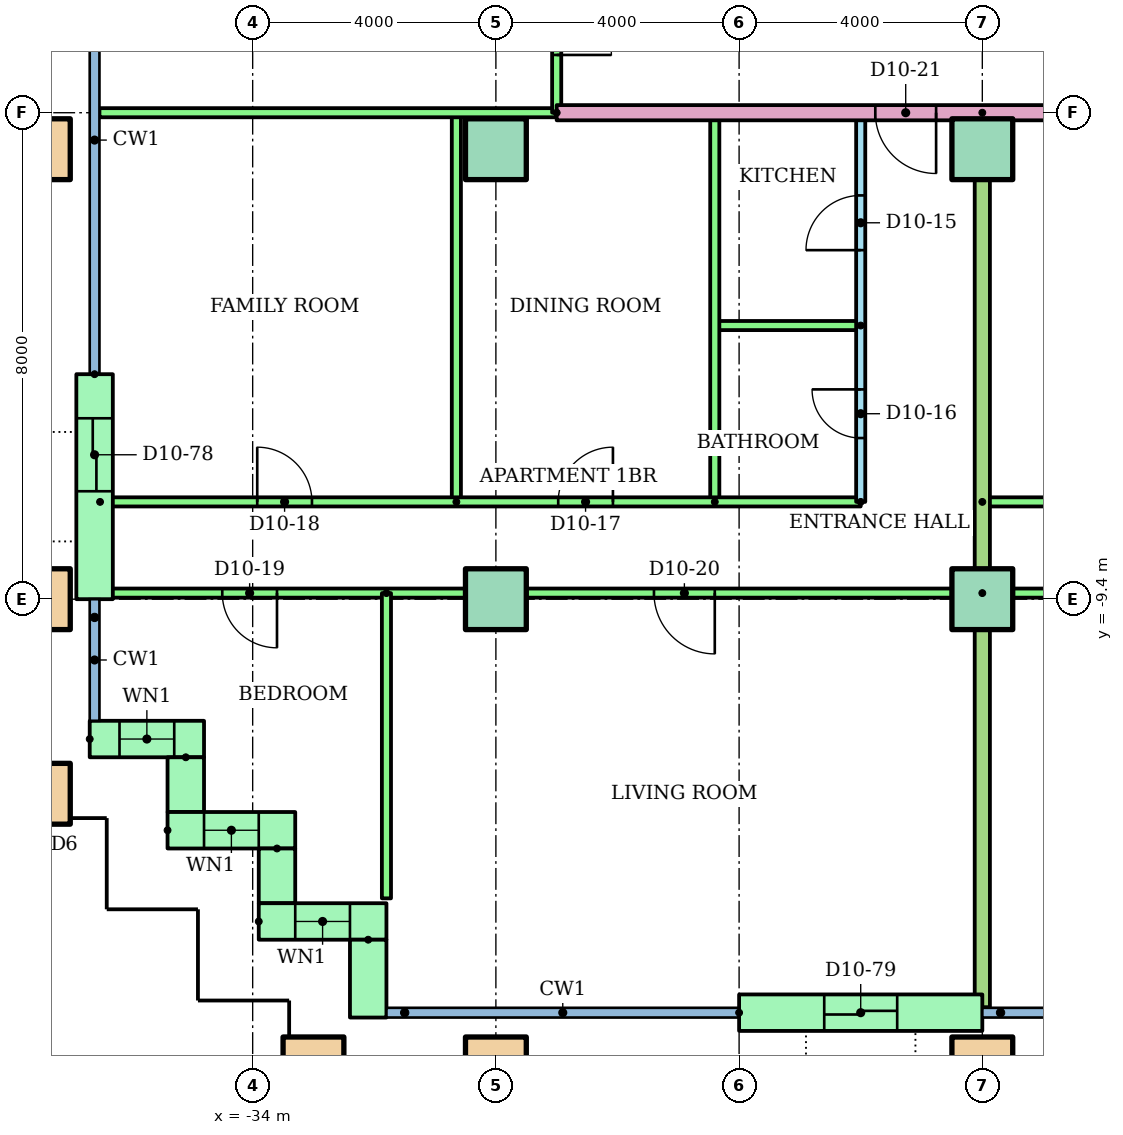
"""IFC4 building model, lengths in metres.
Left out: names, types, materials, properties, quantities, classifications, styles, units other than length and angle.
Written with IfcOpenShell. Run it as: python <this file> out.ifc"""

import sys

from ifc_helpers import new_model, si_unit, direction, frame, frame_2d, origin, origin_2d, place, context, subcontext, project, spatial, rectangle, hollow_rectangle, extrude, element, fill, save


model = new_model("IFC4")
c1 = context("Model", 3, precision=1e-05, world=origin(), true_north=direction((0.0, 1.0)))
c2 = subcontext(c1, "Body", "Model", "MODEL_VIEW")
j1 = project(units=[si_unit("LENGTHUNIT", "METRE"), si_unit("PLANEANGLEUNIT", "RADIAN")], contexts=[c1])
p1 = place(None, origin())
s1 = spatial("IfcSite", under=j1, at=p1, CompositionType="ELEMENT")
p2 = place(p1, origin())
s2 = spatial("IfcBuilding", under=s1, at=p2, CompositionType="ELEMENT")
p3 = place(p2, frame((0.0, 0.0, 41.6)))
s3 = spatial("IfcBuildingStorey", under=s2, at=p3, CompositionType="ELEMENT", Elevation=41.6)
for number, where in (
    (1, (-33.0, -17.1, 0.0)),
    (2, (-30.0, -17.1, 0.0)),
    (3, (-22.0, -17.1, 0.0)),
    (4, (-37.5, -12.6, 0.0)),
    (5, (-37.5, -9.4, 0.0)),
):
    element("IfcColumn", number, at=place(p3, frame(where)), inside=s3, PredefinedType="COLUMN", context=c2, shape_type="SweptSolid", body=[
        extrude(hollow_rectangle(XDim=1.0, YDim=1.0, WallThickness=0.05, at=origin_2d()), origin(), (0.0, 0.0, 1.0), 3.2),
    ])
for number, where in (
    (6, (-30.0, -9.4, 0.0)),
    (7, (-22.0, -9.4, 0.0)),
):
    element("IfcColumn", number, at=place(p3, frame(where)), inside=s3, PredefinedType="COLUMN", context=c2, shape_type="SweptSolid", body=[
        extrude(rectangle(XDim=1.0, YDim=1.0, at=origin_2d()), origin(), (0.0, 0.0, 1.0), 3.2),
    ])
p4 = place(p3, frame((-37.5, -2.0, 0.0)))
e8 = element("IfcColumn", 8, at=p4, inside=s3, PredefinedType="COLUMN", context=c2, shape_type="SweptSolid", body=[
    extrude(hollow_rectangle(XDim=1.0, YDim=1.0, WallThickness=0.05, at=origin_2d()), origin(), (0.0, 0.0, 1.0), 3.2),
])
for number, where in (
    (9, (-30.0, -2.0, 0.0)),
    (10, (-22.0, -2.0, 0.0)),
):
    element("IfcColumn", number, at=place(p3, frame(where)), inside=s3, PredefinedType="COLUMN", context=c2, shape_type="SweptSolid", body=[
        extrude(rectangle(XDim=1.0, YDim=1.0, at=origin_2d()), origin(), (0.0, 0.0, 1.0), 3.2),
    ])
p5 = place(p3, frame((-36.6, -5.7, 0.0), z_axis=(0.0, 0.0, 1.0), x_axis=(0.0, -1.0, 0.0)))
e11 = element("IfcWall", 11, at=p5, inside=s3, PredefinedType="STANDARD", context=c2, shape_type="SweptSolid", body=[
    extrude(rectangle(XDim=3.7, YDim=0.6, at=frame_2d((1.85, 0.0))), origin(), (0.0, 0.0, 1.0), 2.92),
])
p6 = place(p5, frame((0.725, 0.0, 0.0)))
e12 = element("IfcOpeningElement", 12, at=p6, cuts=e11, PredefinedType="OPENING", context=c2, shape_type="SweptSolid", body=[
    extrude(rectangle(XDim=1.2, YDim=2.1, at=frame_2d((0.6, 1.05))), frame((0.0, 0.31, 0.0), z_axis=(0.0, -1.0, 0.0), x_axis=(1.0, 0.0, 0.0)), (0.0, 0.0, 1.0), 0.62),
])
p7 = place(p3, frame((-36.68, -11.7, 0.0)))
e13 = element("IfcWall", 13, at=p7, inside=s3, PredefinedType="STANDARD", context=c2, shape_type="SweptSolid", body=[
    extrude(rectangle(XDim=1.88, YDim=0.6, at=frame_2d((0.94, 0.0))), origin(), (0.0, 0.0, 1.0), 2.92),
])
p8 = place(p7, frame((0.49, 0.0, 0.9)))
e14 = element("IfcOpeningElement", 14, at=p8, cuts=e13, PredefinedType="OPENING", context=c2, shape_type="SweptSolid", body=[
    extrude(rectangle(XDim=0.9, YDim=1.5, at=frame_2d((0.45, 0.75))), frame((0.0, 0.31, 0.0), z_axis=(0.0, -1.0, 0.0), x_axis=(1.0, 0.0, 0.0)), (0.0, 0.0, 1.0), 0.62),
])
p9 = place(p3, frame((-35.1, -12.0, 0.0), z_axis=(0.0, 0.0, 1.0), x_axis=(0.0, -1.0, 0.0)))
e15 = element("IfcWall", 15, at=p9, inside=s3, PredefinedType="STANDARD", context=c2, shape_type="SweptSolid", body=[
    extrude(rectangle(XDim=0.9, YDim=0.6, at=frame_2d((0.45, 0.0))), origin(), (0.0, 0.0, 1.0), 2.92),
])
p10 = place(p3, frame((-35.4, -13.2, 0.0)))
e16 = element("IfcWall", 16, at=p10, inside=s3, PredefinedType="STANDARD", context=c2, shape_type="SweptSolid", body=[
    extrude(rectangle(XDim=2.1, YDim=0.6, at=frame_2d((1.05, 0.0))), origin(), (0.0, 0.0, 1.0), 2.92),
])
p11 = place(p10, frame((0.6, 0.0, 0.9)))
e17 = element("IfcOpeningElement", 17, at=p11, cuts=e16, PredefinedType="OPENING", context=c2, shape_type="SweptSolid", body=[
    extrude(rectangle(XDim=0.9, YDim=1.5, at=frame_2d((0.45, 0.75))), frame((0.0, 0.31, 0.0), z_axis=(0.0, -1.0, 0.0), x_axis=(1.0, 0.0, 0.0)), (0.0, 0.0, 1.0), 0.62),
])
p12 = place(p3, frame((-33.6, -13.5, 0.0), z_axis=(0.0, 0.0, 1.0), x_axis=(0.0, -1.0, 0.0)))
e18 = element("IfcWall", 18, at=p12, inside=s3, PredefinedType="STANDARD", context=c2, shape_type="SweptSolid", body=[
    extrude(rectangle(XDim=0.9, YDim=0.6, at=frame_2d((0.45, 0.0))), origin(), (0.0, 0.0, 1.0), 2.92),
])
p13 = place(p3, frame((-33.9, -14.7, 0.0)))
e19 = element("IfcWall", 19, at=p13, inside=s3, PredefinedType="STANDARD", context=c2, shape_type="SweptSolid", body=[
    extrude(rectangle(XDim=2.1, YDim=0.6, at=frame_2d((1.05, 0.0))), origin(), (0.0, 0.0, 1.0), 2.92),
])
p14 = place(p13, frame((0.6, 0.0, 0.9)))
e20 = element("IfcOpeningElement", 20, at=p14, cuts=e19, PredefinedType="OPENING", context=c2, shape_type="SweptSolid", body=[
    extrude(rectangle(XDim=0.9, YDim=1.5, at=frame_2d((0.45, 0.75))), frame((0.0, 0.31, 0.0), z_axis=(0.0, -1.0, 0.0), x_axis=(1.0, 0.0, 0.0)), (0.0, 0.0, 1.0), 0.62),
])
p15 = place(p3, frame((-32.1, -15.0, 0.0), z_axis=(0.0, 0.0, 1.0), x_axis=(0.0, -1.0, 0.0)))
e21 = element("IfcWall", 21, at=p15, inside=s3, PredefinedType="STANDARD", context=c2, shape_type="SweptSolid", body=[
    extrude(rectangle(XDim=1.28, YDim=0.6, at=frame_2d((0.64, 0.0))), origin(), (0.0, 0.0, 1.0), 2.92),
])
p16 = place(p3, frame((-26.0, -16.2, 0.0)))
e22 = element("IfcWall", 22, at=p16, inside=s3, PredefinedType="STANDARD", context=c2, shape_type="SweptSolid", body=[
    extrude(rectangle(XDim=4.0, YDim=0.6, at=frame_2d((2.0, 0.0))), origin(), (0.0, 0.0, 1.0), 2.92),
])
p17 = place(p16, frame((1.4, 0.0, 0.0)))
e23 = element("IfcOpeningElement", 23, at=p17, cuts=e22, PredefinedType="OPENING", context=c2, shape_type="SweptSolid", body=[
    extrude(rectangle(XDim=1.2, YDim=2.1, at=frame_2d((0.6, 1.05))), frame((0.0, 0.31, 0.0), z_axis=(0.0, -1.0, 0.0), x_axis=(1.0, 0.0, 0.0)), (0.0, 0.0, 1.0), 0.62),
])
p18 = place(p3, frame((-24.0, -7.8, 0.0), z_axis=(0.0, 0.0, 1.0), x_axis=(0.0, 1.0, 0.0)))
e24 = element("IfcWall", 24, at=p18, inside=s3, PredefinedType="PARTITIONING", context=c2, shape_type="SweptSolid", body=[
    extrude(rectangle(XDim=6.4, YDim=0.15, at=frame_2d((3.2, 0.0))), origin(), (0.0, 0.0, 1.0), 2.4),
])
p19 = place(p18, frame((4.14, 0.0, 0.0)))
e25 = element("IfcOpeningElement", 25, at=p19, cuts=e24, PredefinedType="OPENING", context=c2, shape_type="SweptSolid", body=[
    extrude(rectangle(XDim=0.9, YDim=2.1, at=frame_2d((0.45, 1.05))), frame((0.0, 0.085, 0.0), z_axis=(0.0, -1.0, 0.0), x_axis=(1.0, 0.0, 0.0)), (0.0, 0.0, 1.0), 0.17),
])
p20 = place(p18, frame((1.05, 0.0, 0.0)))
e26 = element("IfcOpeningElement", 26, at=p20, cuts=e24, PredefinedType="OPENING", context=c2, shape_type="SweptSolid", body=[
    extrude(rectangle(XDim=0.8, YDim=2.1, at=frame_2d((0.4, 1.05))), frame((0.0, 0.085, 0.0), z_axis=(0.0, -1.0, 0.0), x_axis=(1.0, 0.0, 0.0)), (0.0, 0.0, 1.0), 0.17),
])
p21 = place(p3, frame((-24.0, -4.9, 0.0), z_axis=(0.0, 0.0, 1.0), x_axis=(-1.0, 0.0, 0.0)))
e27 = element("IfcWall", 27, at=p21, inside=s3, PredefinedType="PARTITIONING", context=c2, shape_type="SweptSolid", body=[
    extrude(rectangle(XDim=2.4, YDim=0.15, at=frame_2d((1.2, 0.0))), origin(), (0.0, 0.0, 1.0), 2.4),
])
for number, where, z_axis, x_axis in (
    (28, (-26.4, -7.8, 0.0), (0.0, 0.0, 1.0), (0.0, 1.0, 0.0)),
    (29, (-30.65, -7.8, 0.0), (0.0, 0.0, 1.0), (0.0, 1.0, 0.0)),
):
    element("IfcWall", number, at=place(p3, frame(where, z_axis=z_axis, x_axis=x_axis)), inside=s3, PredefinedType="PARTITIONING", context=c2, shape_type="SweptSolid", body=[
        extrude(rectangle(XDim=6.4, YDim=0.15, at=frame_2d((3.2, 0.0))), origin(), (0.0, 0.0, 1.0), 2.4),
    ])
p22 = place(p3, frame((-36.51, -7.8, 0.0)))
e30 = element("IfcWall", 30, at=p22, inside=s3, PredefinedType="PARTITIONING", context=c2, shape_type="SweptSolid", body=[
    extrude(rectangle(XDim=12.51, YDim=0.15, at=frame_2d((6.255, 0.0))), origin(), (0.0, 0.0, 1.0), 2.4),
])
p23 = place(p22, frame((7.535, 0.0, 0.0)))
e31 = element("IfcOpeningElement", 31, at=p23, cuts=e30, PredefinedType="OPENING", context=c2, shape_type="SweptSolid", body=[
    extrude(rectangle(XDim=0.9, YDim=2.1, at=frame_2d((0.45, 1.05))), frame((0.0, 0.085, 0.0), z_axis=(0.0, -1.0, 0.0), x_axis=(1.0, 0.0, 0.0)), (0.0, 0.0, 1.0), 0.17),
])
p24 = place(p22, frame((2.585, 0.0, 0.0)))
e32 = element("IfcOpeningElement", 32, at=p24, cuts=e30, PredefinedType="OPENING", context=c2, shape_type="SweptSolid", body=[
    extrude(rectangle(XDim=0.9, YDim=2.1, at=frame_2d((0.45, 1.05))), frame((0.0, 0.085, 0.0), z_axis=(0.0, -1.0, 0.0), x_axis=(1.0, 0.0, 0.0)), (0.0, 0.0, 1.0), 0.17),
])
p25 = place(p3, frame((-22.0, -9.3, 0.0), z_axis=(0.0, 0.0, 1.0), x_axis=(-1.0, 0.0, 0.0)))
e33 = element("IfcWall", 33, at=p25, inside=s3, PredefinedType="PARTITIONING", context=c2, shape_type="SweptSolid", body=[
    extrude(rectangle(XDim=14.51, YDim=0.15, at=frame_2d((7.255, 0.0))), origin(), (0.0, 0.0, 1.0), 2.4),
])
p26 = place(p25, frame((11.6, 0.0, 0.0)))
e34 = element("IfcOpeningElement", 34, at=p26, cuts=e33, PredefinedType="OPENING", context=c2, shape_type="SweptSolid", body=[
    extrude(rectangle(XDim=0.9, YDim=2.1, at=frame_2d((0.45, 1.05))), frame((0.0, 0.085, 0.0), z_axis=(0.0, -1.0, 0.0), x_axis=(1.0, 0.0, 0.0)), (0.0, 0.0, 1.0), 0.17),
])
p27 = place(p25, frame((4.4, 0.0, 0.0)))
e35 = element("IfcOpeningElement", 35, at=p27, cuts=e33, PredefinedType="OPENING", context=c2, shape_type="SweptSolid", body=[
    extrude(rectangle(XDim=1.0, YDim=2.1, at=frame_2d((0.5, 1.05))), frame((0.0, 0.085, 0.0), z_axis=(0.0, -1.0, 0.0), x_axis=(1.0, 0.0, 0.0)), (0.0, 0.0, 1.0), 0.17),
])
p28 = place(p3, frame((-31.8, -9.3, 0.0), z_axis=(0.0, 0.0, 1.0), x_axis=(0.0, -1.0, 0.0)))
e36 = element("IfcWall", 36, at=p28, inside=s3, PredefinedType="PARTITIONING", context=c2, shape_type="SweptSolid", body=[
    extrude(rectangle(XDim=5.02, YDim=0.15, at=frame_2d((2.51, 0.0))), origin(), (0.0, 0.0, 1.0), 2.4),
])
p29 = place(p3, frame((-22.0, -7.8, 0.0)))
e37 = element("IfcWall", 37, at=p29, inside=s3, PredefinedType="PARTITIONING", context=c2, shape_type="SweptSolid", body=[
    extrude(rectangle(XDim=22.0, YDim=0.15, at=frame_2d((11.0, 0.0))), origin(), (0.0, 0.0, 1.0), 2.4),
])
p30 = place(p29, frame((14.34, 0.0, 0.0)))
e38 = element("IfcOpeningElement", 38, at=p30, cuts=e37, PredefinedType="OPENING", context=c2, shape_type="SweptSolid", body=[
    extrude(rectangle(XDim=0.9, YDim=2.1, at=frame_2d((0.45, 1.05))), frame((0.0, 0.085, 0.0), z_axis=(0.0, -1.0, 0.0), x_axis=(1.0, 0.0, 0.0)), (0.0, 0.0, 1.0), 0.17),
])
p31 = place(p29, frame((8.76, 0.0, 0.0)))
e39 = element("IfcOpeningElement", 39, at=p31, cuts=e37, PredefinedType="OPENING", context=c2, shape_type="SweptSolid", body=[
    extrude(rectangle(XDim=0.9, YDim=2.1, at=frame_2d((0.45, 1.05))), frame((0.0, 0.085, 0.0), z_axis=(0.0, -1.0, 0.0), x_axis=(1.0, 0.0, 0.0)), (0.0, 0.0, 1.0), 0.17),
])
p32 = place(p29, frame((1.975, 0.0, 0.0)))
e40 = element("IfcOpeningElement", 40, at=p32, cuts=e37, PredefinedType="OPENING", context=c2, shape_type="SweptSolid", body=[
    extrude(rectangle(XDim=0.9, YDim=2.1, at=frame_2d((0.45, 1.05))), frame((0.0, 0.085, 0.0), z_axis=(0.0, -1.0, 0.0), x_axis=(1.0, 0.0, 0.0)), (0.0, 0.0, 1.0), 0.17),
])
p33 = place(p3, frame((2.0, -9.3, 0.0), z_axis=(0.0, 0.0, 1.0), x_axis=(-1.0, 0.0, 0.0)))
e41 = element("IfcWall", 41, at=p33, inside=s3, PredefinedType="PARTITIONING", context=c2, shape_type="SweptSolid", body=[
    extrude(rectangle(XDim=24.0, YDim=0.15, at=frame_2d((12.0, 0.0))), origin(), (0.0, 0.0, 1.0), 2.4),
])
p34 = place(p33, frame((19.5, 0.0, 0.0)))
e42 = element("IfcOpeningElement", 42, at=p34, cuts=e41, PredefinedType="OPENING", context=c2, shape_type="SweptSolid", body=[
    extrude(rectangle(XDim=1.0, YDim=2.1, at=frame_2d((0.5, 1.05))), frame((0.0, 0.085, 0.0), z_axis=(0.0, -1.0, 0.0), x_axis=(1.0, 0.0, 0.0)), (0.0, 0.0, 1.0), 0.17),
])
p35 = place(p33, frame((13.55, 0.0, 0.0)))
e43 = element("IfcOpeningElement", 43, at=p35, cuts=e41, PredefinedType="OPENING", context=c2, shape_type="SweptSolid", body=[
    extrude(rectangle(XDim=0.9, YDim=2.1, at=frame_2d((0.45, 1.05))), frame((0.0, 0.085, 0.0), z_axis=(0.0, -1.0, 0.0), x_axis=(1.0, 0.0, 0.0)), (0.0, 0.0, 1.0), 0.17),
])
p36 = place(p33, frame((9.55, 0.0, 0.0)))
e44 = element("IfcOpeningElement", 44, at=p36, cuts=e41, PredefinedType="OPENING", context=c2, shape_type="SweptSolid", body=[
    extrude(rectangle(XDim=0.9, YDim=2.1, at=frame_2d((0.45, 1.05))), frame((0.0, 0.085, 0.0), z_axis=(0.0, -1.0, 0.0), x_axis=(1.0, 0.0, 0.0)), (0.0, 0.0, 1.0), 0.17),
])
p37 = place(p33, frame((5.55, 0.0, 0.0)))
e45 = element("IfcOpeningElement", 45, at=p37, cuts=e41, PredefinedType="OPENING", context=c2, shape_type="SweptSolid", body=[
    extrude(rectangle(XDim=0.9, YDim=2.1, at=frame_2d((0.45, 1.05))), frame((0.0, 0.085, 0.0), z_axis=(0.0, -1.0, 0.0), x_axis=(1.0, 0.0, 0.0)), (0.0, 0.0, 1.0), 0.17),
])
p38 = place(p33, frame((1.55, 0.0, 0.0)))
e46 = element("IfcOpeningElement", 46, at=p38, cuts=e41, PredefinedType="OPENING", context=c2, shape_type="SweptSolid", body=[
    extrude(rectangle(XDim=0.9, YDim=2.1, at=frame_2d((0.45, 1.05))), frame((0.0, 0.085, 0.0), z_axis=(0.0, -1.0, 0.0), x_axis=(1.0, 0.0, 0.0)), (0.0, 0.0, 1.0), 0.17),
])
p39 = place(p3, frame((-22.0, -1.4, 0.0), z_axis=(0.0, 0.0, 1.0), x_axis=(0.0, -1.0, 0.0)))
e47 = element("IfcWall", 47, at=p39, inside=s3, PredefinedType="PARTITIONING", context=c2, shape_type="SweptSolid", body=[
    extrude(rectangle(XDim=14.71, YDim=0.25, at=frame_2d((7.355, 0.0))), origin(), (0.0, 0.0, 1.0), 2.4),
])
p40 = place(p3, frame((-14.0, -1.4, 0.0), z_axis=(0.0, 0.0, 1.0), x_axis=(-1.0, 0.0, 0.0)))
e48 = element("IfcWall", 48, at=p40, inside=s3, PredefinedType="PARTITIONING", context=c2, shape_type="SweptSolid", body=[
    extrude(rectangle(XDim=15.0, YDim=0.25, at=frame_2d((7.5, 0.0))), origin(), (0.0, 0.0, 1.0), 2.4),
])
p41 = place(p40, frame((8.76, 0.0, 0.0)))
e49 = element("IfcOpeningElement", 49, at=p41, cuts=e48, PredefinedType="OPENING", context=c2, shape_type="SweptSolid", body=[
    extrude(rectangle(XDim=1.0, YDim=2.1, at=frame_2d((0.5, 1.05))), frame((0.0, 0.135, 0.0), z_axis=(0.0, -1.0, 0.0), x_axis=(1.0, 0.0, 0.0)), (0.0, 0.0, 1.0), 0.27),
])
p42 = place(p3, frame((-29.0, -1.4, 0.0), z_axis=(0.0, 0.0, 1.0), x_axis=(-1.0, 0.0, 0.0)))
e50 = element("IfcWall", 50, at=p42, inside=s3, PredefinedType="PARTITIONING", context=c2, shape_type="SweptSolid", body=[
    extrude(rectangle(XDim=7.52, YDim=0.15, at=frame_2d((3.76, 0.0))), origin(), (0.0, 0.0, 1.0), 2.4),
])
p43 = place(p3, frame((-29.0, 1.4, 0.0), z_axis=(0.0, 0.0, 1.0), x_axis=(0.0, -1.0, 0.0)))
e51 = element("IfcWall", 51, at=p43, inside=s3, PredefinedType="PARTITIONING", context=c2, shape_type="SweptSolid", body=[
    extrude(rectangle(XDim=2.8, YDim=0.15, at=frame_2d((1.4, 0.0))), origin(), (0.0, 0.0, 1.0), 2.4),
])
p44 = place(p43, frame((0.95, 0.0, 0.0)))
e52 = element("IfcOpeningElement", 52, at=p44, cuts=e51, PredefinedType="OPENING", context=c2, shape_type="SweptSolid", body=[
    extrude(rectangle(XDim=0.9, YDim=2.1, at=frame_2d((0.45, 1.05))), frame((0.0, 0.085, 0.0), z_axis=(0.0, -1.0, 0.0), x_axis=(1.0, 0.0, 0.0)), (0.0, 0.0, 1.0), 0.17),
])
p45 = place(p8, origin())
e53 = element("IfcWindow", 53, at=p45, inside=s3, PartitioningType="SINGLE_PANEL", PredefinedType="WINDOW", context=c2, shape_type="SweptSolid", body=[
    extrude(rectangle(XDim=0.9, YDim=1.5, at=frame_2d((0.45, 0.75))), frame((0.0, 0.03, 0.0), z_axis=(0.0, -1.0, 0.0), x_axis=(1.0, 0.0, 0.0)), (0.0, 0.0, 1.0), 0.06),
])
fill(e14, e53)
p46 = place(p11, origin())
e54 = element("IfcWindow", 54, at=p46, inside=s3, PartitioningType="SINGLE_PANEL", PredefinedType="WINDOW", context=c2, shape_type="SweptSolid", body=[
    extrude(rectangle(XDim=0.9, YDim=1.5, at=frame_2d((0.45, 0.75))), frame((0.0, 0.03, 0.0), z_axis=(0.0, -1.0, 0.0), x_axis=(1.0, 0.0, 0.0)), (0.0, 0.0, 1.0), 0.06),
])
fill(e17, e54)
p47 = place(p14, origin())
e55 = element("IfcWindow", 55, at=p47, inside=s3, PartitioningType="SINGLE_PANEL", PredefinedType="WINDOW", context=c2, shape_type="SweptSolid", body=[
    extrude(rectangle(XDim=0.9, YDim=1.5, at=frame_2d((0.45, 0.75))), frame((0.0, 0.03, 0.0), z_axis=(0.0, -1.0, 0.0), x_axis=(1.0, 0.0, 0.0)), (0.0, 0.0, 1.0), 0.06),
])
fill(e20, e55)
p48 = place(p19, origin())
e56 = element("IfcDoor", 56, at=p48, inside=s3, OperationType="SINGLE_SWING_LEFT", PredefinedType="DOOR", context=c2, shape_type="SweptSolid", body=[
    extrude(rectangle(XDim=0.9, YDim=2.1, at=frame_2d((0.45, 1.05))), frame((0.0, 0.025, 0.0), z_axis=(0.0, -1.0, 0.0), x_axis=(1.0, 0.0, 0.0)), (0.0, 0.0, 1.0), 0.05),
])
fill(e25, e56)
p49 = place(p20, origin())
e57 = element("IfcDoor", 57, at=p49, inside=s3, OperationType="SINGLE_SWING_RIGHT", PredefinedType="DOOR", context=c2, shape_type="SweptSolid", body=[
    extrude(rectangle(XDim=0.8, YDim=2.1, at=frame_2d((0.4, 1.05))), frame((0.0, 0.025, 0.0), z_axis=(0.0, -1.0, 0.0), x_axis=(1.0, 0.0, 0.0)), (0.0, 0.0, 1.0), 0.05),
])
fill(e26, e57)
p50 = place(p23, origin())
e58 = element("IfcDoor", 58, at=p50, inside=s3, OperationType="SINGLE_SWING_RIGHT", PredefinedType="DOOR", context=c2, shape_type="SweptSolid", body=[
    extrude(rectangle(XDim=0.9, YDim=2.1, at=frame_2d((0.45, 1.05))), frame((0.0, 0.025, 0.0), z_axis=(0.0, -1.0, 0.0), x_axis=(1.0, 0.0, 0.0)), (0.0, 0.0, 1.0), 0.05),
])
fill(e31, e58)
p51 = place(p24, origin())
e59 = element("IfcDoor", 59, at=p51, inside=s3, OperationType="SINGLE_SWING_LEFT", PredefinedType="DOOR", context=c2, shape_type="SweptSolid", body=[
    extrude(rectangle(XDim=0.9, YDim=2.1, at=frame_2d((0.45, 1.05))), frame((0.0, 0.025, 0.0), z_axis=(0.0, -1.0, 0.0), x_axis=(1.0, 0.0, 0.0)), (0.0, 0.0, 1.0), 0.05),
])
fill(e32, e59)
p52 = place(p26, origin())
e60 = element("IfcDoor", 60, at=p52, inside=s3, OperationType="SINGLE_SWING_LEFT", PredefinedType="DOOR", context=c2, shape_type="SweptSolid", body=[
    extrude(rectangle(XDim=0.9, YDim=2.1, at=frame_2d((0.45, 1.05))), frame((0.0, 0.025, 0.0), z_axis=(0.0, -1.0, 0.0), x_axis=(1.0, 0.0, 0.0)), (0.0, 0.0, 1.0), 0.05),
])
fill(e34, e60)
p53 = place(p27, origin())
e61 = element("IfcDoor", 61, at=p53, inside=s3, OperationType="SINGLE_SWING_LEFT", PredefinedType="DOOR", context=c2, shape_type="SweptSolid", body=[
    extrude(rectangle(XDim=1.0, YDim=2.1, at=frame_2d((0.5, 1.05))), frame((0.0, 0.025, 0.0), z_axis=(0.0, -1.0, 0.0), x_axis=(1.0, 0.0, 0.0)), (0.0, 0.0, 1.0), 0.05),
])
fill(e35, e61)
p54 = place(p41, origin())
e62 = element("IfcDoor", 62, at=p54, inside=s3, OperationType="SINGLE_SWING_LEFT", PredefinedType="DOOR", context=c2, shape_type="SweptSolid", body=[
    extrude(rectangle(XDim=1.0, YDim=2.1, at=frame_2d((0.5, 1.05))), frame((0.0, 0.025, 0.0), z_axis=(0.0, -1.0, 0.0), x_axis=(1.0, 0.0, 0.0)), (0.0, 0.0, 1.0), 0.05),
])
fill(e49, e62)
p55 = place(p44, origin())
e63 = element("IfcDoor", 63, at=p55, inside=s3, OperationType="SINGLE_SWING_RIGHT", PredefinedType="DOOR", context=c2, shape_type="SweptSolid", body=[
    extrude(rectangle(XDim=0.9, YDim=2.1, at=frame_2d((0.45, 1.05))), frame((0.0, 0.025, 0.0), z_axis=(0.0, -1.0, 0.0), x_axis=(1.0, 0.0, 0.0)), (0.0, 0.0, 1.0), 0.05),
])
fill(e52, e63)
p56 = place(p6, origin())
e64 = element("IfcDoor", 64, at=p56, inside=s3, OperationType="SLIDING_TO_LEFT", PredefinedType="DOOR", context=c2, shape_type="SweptSolid", body=[
    extrude(rectangle(XDim=1.2, YDim=2.1, at=frame_2d((0.6, 1.05))), frame((0.0, 0.025, 0.0), z_axis=(0.0, -1.0, 0.0), x_axis=(1.0, 0.0, 0.0)), (0.0, 0.0, 1.0), 0.05),
])
fill(e12, e64)
p57 = place(p17, origin())
e65 = element("IfcDoor", 65, at=p57, inside=s3, OperationType="SLIDING_TO_LEFT", PredefinedType="DOOR", context=c2, shape_type="SweptSolid", body=[
    extrude(rectangle(XDim=1.2, YDim=2.1, at=frame_2d((0.6, 1.05))), frame((0.0, 0.025, 0.0), z_axis=(0.0, -1.0, 0.0), x_axis=(1.0, 0.0, 0.0)), (0.0, 0.0, 1.0), 0.05),
])
fill(e23, e65)
save(model, sys.argv[1])
